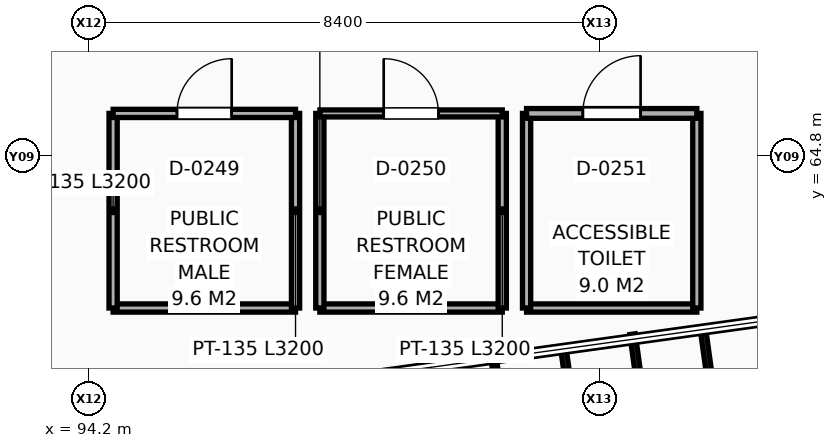
"""IFC4 building model, lengths in metres.
Left out: names, types, materials, properties, quantities, classifications, styles, units other than length and angle.
Written with IfcOpenShell. Run it as: python <this file> out.ifc"""

import sys

from ifc_helpers import new_model, si_unit, direction, frame, frame_2d, origin, place, context, subcontext, project, spatial, rectangle, extrude, element, fill, save


model = new_model("IFC4")
c1 = context("Model", 3, precision=1e-05, world=origin(), true_north=direction((0.0, 1.0)))
c2 = subcontext(c1, "Body", "Model", "MODEL_VIEW")
j1 = project(units=[si_unit("LENGTHUNIT", "METRE"), si_unit("PLANEANGLEUNIT", "RADIAN")], contexts=[c1])
p1 = place(None, origin())
s1 = spatial("IfcSite", under=j1, at=p1, CompositionType="ELEMENT")
p2 = place(p1, origin())
s2 = spatial("IfcBuilding", under=s1, at=p2, CompositionType="ELEMENT")
p3 = place(p2, frame((0.0, 0.0, 18.0)))
s3 = spatial("IfcBuildingStorey", under=s2, at=p3, CompositionType="ELEMENT", Elevation=18.0)
p4 = place(p3, frame((94.6, 62.3, 0.0), z_axis=(0.0, 0.0, 1.0), x_axis=(1.0, 0.0, 0.0)))
e1 = element("IfcWall", 1, at=p4, inside=s3, PredefinedType="PARTITIONING", context=c2, shape_type="SweptSolid", body=[
    extrude(rectangle(XDim=3.0, YDim=0.135, at=frame_2d((1.5, 0.0))), origin(), (0.0, 0.0, 1.0), 3.86),
])
for number, where, z_axis, x_axis in (
    (2, (97.6, 62.3, 0.0), (0.0, 0.0, 1.0), (0.0, 1.0, 0.0)),
    (3, (94.6, 62.3, 0.0), (0.0, 0.0, 1.0), (0.0, 1.0, 0.0)),
):
    element("IfcWall", number, at=place(p3, frame(where, z_axis=z_axis, x_axis=x_axis)), inside=s3, PredefinedType="PARTITIONING", context=c2, shape_type="SweptSolid", body=[
        extrude(rectangle(XDim=3.2, YDim=0.135, at=frame_2d((1.6, 0.0))), origin(), (0.0, 0.0, 1.0), 3.86),
    ])
p5 = place(p3, frame((94.6, 65.5, 0.0), z_axis=(0.0, 0.0, 1.0), x_axis=(1.0, 0.0, 0.0)))
e4 = element("IfcWall", 4, at=p5, inside=s3, PredefinedType="PARTITIONING", context=c2, shape_type="SweptSolid", body=[
    extrude(rectangle(XDim=3.0, YDim=0.135, at=frame_2d((1.5, 0.0))), origin(), (0.0, 0.0, 1.0), 3.86),
])
p6 = place(p5, frame((1.05, 0.0, 0.0)))
e5 = element("IfcOpeningElement", 5, at=p6, cuts=e4, PredefinedType="OPENING", context=c2, shape_type="SweptSolid", body=[
    extrude(rectangle(XDim=0.9, YDim=2.1, at=frame_2d((0.45, 1.05))), frame((0.0, 0.077, 0.0), z_axis=(0.0, -1.0, 0.0), x_axis=(1.0, 0.0, 0.0)), (0.0, 0.0, 1.0), 0.155),
])
p7 = place(p3, frame((98.0, 62.3, 0.0), z_axis=(0.0, 0.0, 1.0), x_axis=(1.0, 0.0, 0.0)))
e6 = element("IfcWall", 6, at=p7, inside=s3, PredefinedType="PARTITIONING", context=c2, shape_type="SweptSolid", body=[
    extrude(rectangle(XDim=3.0, YDim=0.135, at=frame_2d((1.5, 0.0))), origin(), (0.0, 0.0, 1.0), 3.86),
])
for number, where, z_axis, x_axis in (
    (7, (101.0, 62.3, 0.0), (0.0, 0.0, 1.0), (0.0, 1.0, 0.0)),
    (8, (98.0, 62.3, 0.0), (0.0, 0.0, 1.0), (0.0, 1.0, 0.0)),
):
    element("IfcWall", number, at=place(p3, frame(where, z_axis=z_axis, x_axis=x_axis)), inside=s3, PredefinedType="PARTITIONING", context=c2, shape_type="SweptSolid", body=[
        extrude(rectangle(XDim=3.2, YDim=0.135, at=frame_2d((1.6, 0.0))), origin(), (0.0, 0.0, 1.0), 3.86),
    ])
p8 = place(p3, frame((98.0, 65.5, 0.0), z_axis=(0.0, 0.0, 1.0), x_axis=(1.0, 0.0, 0.0)))
e9 = element("IfcWall", 9, at=p8, inside=s3, PredefinedType="PARTITIONING", context=c2, shape_type="SweptSolid", body=[
    extrude(rectangle(XDim=3.0, YDim=0.115, at=frame_2d((1.5, 0.0))), origin(), (0.0, 0.0, 1.0), 3.86),
])
p9 = place(p8, frame((1.05, 0.0, 0.0)))
e10 = element("IfcOpeningElement", 10, at=p9, cuts=e9, PredefinedType="OPENING", context=c2, shape_type="SweptSolid", body=[
    extrude(rectangle(XDim=0.9, YDim=2.1, at=frame_2d((0.45, 1.05))), frame((0.0, 0.067, 0.0), z_axis=(0.0, -1.0, 0.0), x_axis=(1.0, 0.0, 0.0)), (0.0, 0.0, 1.0), 0.135),
])
p10 = place(p3, frame((101.4, 62.3, 0.0), z_axis=(0.0, 0.0, 1.0), x_axis=(1.0, 0.0, 0.0)))
e11 = element("IfcWall", 11, at=p10, inside=s3, PredefinedType="PARTITIONING", context=c2, shape_type="SweptSolid", body=[
    extrude(rectangle(XDim=2.8, YDim=0.135, at=frame_2d((1.4, 0.0))), origin(), (0.0, 0.0, 1.0), 3.86),
])
for number, where, z_axis, x_axis in (
    (12, (104.2, 62.3, 0.0), (0.0, 0.0, 1.0), (0.0, 1.0, 0.0)),
    (13, (101.4, 62.3, 0.0), (0.0, 0.0, 1.0), (0.0, 1.0, 0.0)),
):
    element("IfcWall", number, at=place(p3, frame(where, z_axis=z_axis, x_axis=x_axis)), inside=s3, PredefinedType="PARTITIONING", context=c2, shape_type="SweptSolid", body=[
        extrude(rectangle(XDim=3.2, YDim=0.135, at=frame_2d((1.6, 0.0))), origin(), (0.0, 0.0, 1.0), 3.86),
    ])
p11 = place(p3, frame((101.4, 65.5, 0.0), z_axis=(0.0, 0.0, 1.0), x_axis=(1.0, 0.0, 0.0)))
e14 = element("IfcWall", 14, at=p11, inside=s3, PredefinedType="PARTITIONING", context=c2, shape_type="SweptSolid", body=[
    extrude(rectangle(XDim=2.8, YDim=0.16, at=frame_2d((1.4, 0.0))), origin(), (0.0, 0.0, 1.0), 3.664),
])
p12 = place(p11, frame((0.925, 0.0, 0.0)))
e15 = element("IfcOpeningElement", 15, at=p12, cuts=e14, PredefinedType="OPENING", context=c2, shape_type="SweptSolid", body=[
    extrude(rectangle(XDim=0.95, YDim=2.1, at=frame_2d((0.475, 1.05))), frame((0.0, 0.09, 0.0), z_axis=(0.0, -1.0, 0.0), x_axis=(1.0, 0.0, 0.0)), (0.0, 0.0, 1.0), 0.18),
])
p13 = place(p6, origin())
e16 = element("IfcDoor", 16, at=p13, inside=s3, OperationType="SINGLE_SWING_RIGHT", PredefinedType="DOOR", context=c2, shape_type="SweptSolid", body=[
    extrude(rectangle(XDim=0.9, YDim=2.1, at=frame_2d((0.45, 1.05))), frame((0.0, 0.025, 0.0), z_axis=(0.0, -1.0, 0.0), x_axis=(1.0, 0.0, 0.0)), (0.0, 0.0, 1.0), 0.05),
])
fill(e5, e16)
p14 = place(p9, origin())
e17 = element("IfcDoor", 17, at=p14, inside=s3, OperationType="SINGLE_SWING_LEFT", PredefinedType="DOOR", context=c2, shape_type="SweptSolid", body=[
    extrude(rectangle(XDim=0.9, YDim=2.1, at=frame_2d((0.45, 1.05))), frame((0.0, 0.025, 0.0), z_axis=(0.0, -1.0, 0.0), x_axis=(1.0, 0.0, 0.0)), (0.0, 0.0, 1.0), 0.05),
])
fill(e10, e17)
p15 = place(p12, origin())
e18 = element("IfcDoor", 18, at=p15, inside=s3, OperationType="SINGLE_SWING_RIGHT", PredefinedType="DOOR", context=c2, shape_type="SweptSolid", body=[
    extrude(rectangle(XDim=0.95, YDim=2.1, at=frame_2d((0.475, 1.05))), frame((0.0, 0.025, 0.0), z_axis=(0.0, -1.0, 0.0), x_axis=(1.0, 0.0, 0.0)), (0.0, 0.0, 1.0), 0.05),
])
fill(e15, e18)
save(model, sys.argv[1])
